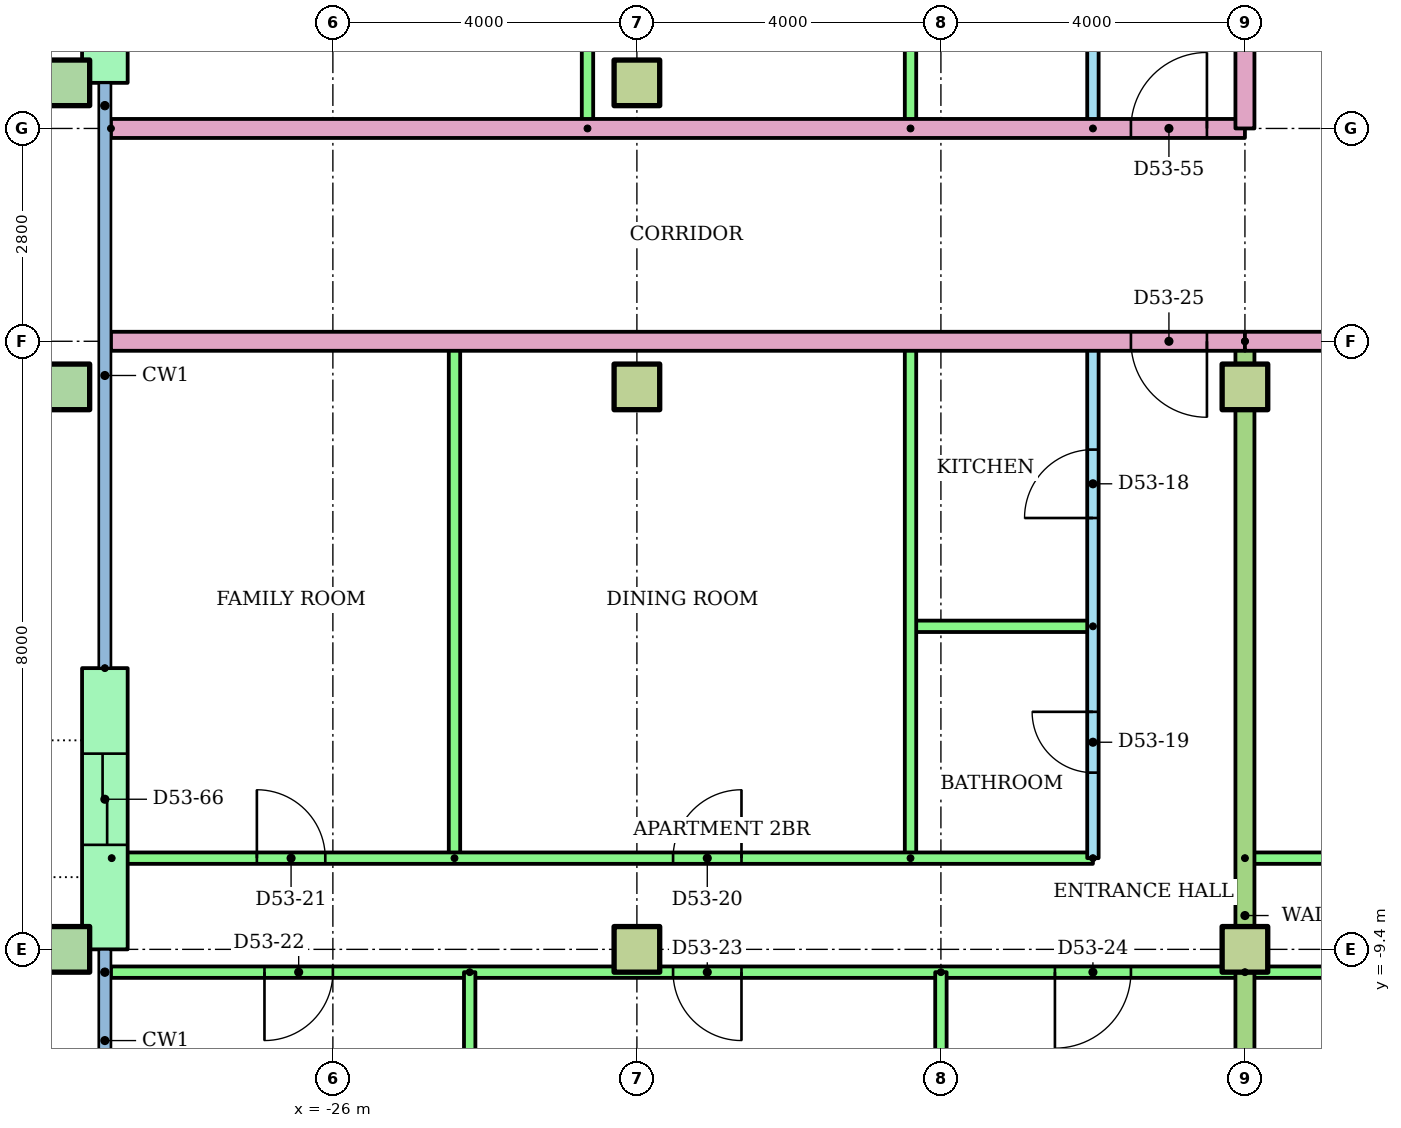
"""IFC4 building model, lengths in metres.
Left out: names, types, materials, properties, quantities, classifications, styles, units other than length and angle.
Written with IfcOpenShell. Run it as: python <this file> out.ifc"""

import sys

from ifc_helpers import new_model, si_unit, direction, frame, frame_2d, origin, origin_2d, place, context, subcontext, project, spatial, rectangle, hollow_rectangle, extrude, element, fill, save


model = new_model("IFC4")
c1 = context("Model", 3, precision=1e-05, world=origin(), true_north=direction((0.0, 1.0)))
c2 = subcontext(c1, "Body", "Model", "MODEL_VIEW")
j1 = project(units=[si_unit("LENGTHUNIT", "METRE"), si_unit("PLANEANGLEUNIT", "RADIAN")], contexts=[c1])
p1 = place(None, origin())
s1 = spatial("IfcSite", under=j1, at=p1, CompositionType="ELEMENT")
p2 = place(p1, origin())
s2 = spatial("IfcBuilding", under=s1, at=p2, CompositionType="ELEMENT")
p3 = place(p2, frame((0.0, 0.0, 207.6)))
s3 = spatial("IfcBuildingStorey", under=s2, at=p3, CompositionType="ELEMENT", Elevation=207.6)
p4 = place(p3, frame((-29.5, -9.4, 0.0)))
e1 = element("IfcColumn", 1, at=p4, inside=s3, PredefinedType="COLUMN", context=c2, shape_type="SweptSolid", body=[
    extrude(hollow_rectangle(XDim=0.6, YDim=0.6, WallThickness=0.03, at=origin_2d()), origin(), (0.0, 0.0, 1.0), 3.2),
])
for number, where in (
    (2, (-22.0, -9.4, 0.0)),
    (3, (-14.0, -9.4, 0.0)),
):
    element("IfcColumn", number, at=place(p3, frame(where)), inside=s3, PredefinedType="COLUMN", context=c2, shape_type="SweptSolid", body=[
        extrude(rectangle(XDim=0.6, YDim=0.6, at=origin_2d()), origin(), (0.0, 0.0, 1.0), 3.2),
    ])
p5 = place(p3, frame((-29.5, -2.0, 0.0)))
e4 = element("IfcColumn", 4, at=p5, inside=s3, PredefinedType="COLUMN", context=c2, shape_type="SweptSolid", body=[
    extrude(hollow_rectangle(XDim=0.6, YDim=0.6, WallThickness=0.03, at=origin_2d()), origin(), (0.0, 0.0, 1.0), 3.2),
])
for number, where in (
    (5, (-22.0, -2.0, 0.0)),
    (6, (-14.0, -2.0, 0.0)),
):
    element("IfcColumn", number, at=place(p3, frame(where)), inside=s3, PredefinedType="COLUMN", context=c2, shape_type="SweptSolid", body=[
        extrude(rectangle(XDim=0.6, YDim=0.6, at=origin_2d()), origin(), (0.0, 0.0, 1.0), 3.2),
    ])
p6 = place(p3, frame((-29.5, 2.0, 0.0)))
e7 = element("IfcColumn", 7, at=p6, inside=s3, PredefinedType="COLUMN", context=c2, shape_type="SweptSolid", body=[
    extrude(hollow_rectangle(XDim=0.6, YDim=0.6, WallThickness=0.03, at=origin_2d()), origin(), (0.0, 0.0, 1.0), 3.2),
])
p7 = place(p3, frame((-22.0, 2.0, 0.0)))
e8 = element("IfcColumn", 8, at=p7, inside=s3, PredefinedType="COLUMN", context=c2, shape_type="SweptSolid", body=[
    extrude(rectangle(XDim=0.6, YDim=0.6, at=origin_2d()), origin(), (0.0, 0.0, 1.0), 3.2),
])
p8 = place(p3, frame((-29.0, 6.5, 0.0), z_axis=(0.0, 0.0, 1.0), x_axis=(0.0, -1.0, 0.0)))
e9 = element("IfcWall", 9, at=p8, inside=s3, PredefinedType="STANDARD", context=c2, shape_type="SweptSolid", body=[
    extrude(rectangle(XDim=4.5, YDim=0.6, at=frame_2d((2.25, 0.0))), origin(), (0.0, 0.0, 1.0), 2.92),
])
p9 = place(p8, frame((1.65, 0.0, 0.0)))
e10 = element("IfcOpeningElement", 10, at=p9, cuts=e9, PredefinedType="OPENING", context=c2, shape_type="SweptSolid", body=[
    extrude(rectangle(XDim=1.2, YDim=2.1, at=frame_2d((0.6, 1.05))), frame((0.0, 0.31, 0.0), z_axis=(0.0, -1.0, 0.0), x_axis=(1.0, 0.0, 0.0)), (0.0, 0.0, 1.0), 0.62),
])
p10 = place(p3, frame((-29.0, -5.7, 0.0), z_axis=(0.0, 0.0, 1.0), x_axis=(0.0, -1.0, 0.0)))
e11 = element("IfcWall", 11, at=p10, inside=s3, PredefinedType="STANDARD", context=c2, shape_type="SweptSolid", body=[
    extrude(rectangle(XDim=3.7, YDim=0.6, at=frame_2d((1.85, 0.0))), origin(), (0.0, 0.0, 1.0), 2.92),
])
p11 = place(p10, frame((1.125, 0.0, 0.0)))
e12 = element("IfcOpeningElement", 12, at=p11, cuts=e11, PredefinedType="OPENING", context=c2, shape_type="SweptSolid", body=[
    extrude(rectangle(XDim=1.2, YDim=2.1, at=frame_2d((0.6, 1.05))), frame((0.0, 0.31, 0.0), z_axis=(0.0, -1.0, 0.0), x_axis=(1.0, 0.0, 0.0)), (0.0, 0.0, 1.0), 0.62),
])
p12 = place(p3, frame((-16.0, -8.2, 0.0), z_axis=(0.0, 0.0, 1.0), x_axis=(0.0, 1.0, 0.0)))
e13 = element("IfcWall", 13, at=p12, inside=s3, PredefinedType="PARTITIONING", context=c2, shape_type="SweptSolid", body=[
    extrude(rectangle(XDim=6.8, YDim=0.15, at=frame_2d((3.4, 0.0))), origin(), (0.0, 0.0, 1.0), 2.4),
])
p13 = place(p12, frame((4.475, 0.0, 0.0)))
e14 = element("IfcOpeningElement", 14, at=p13, cuts=e13, PredefinedType="OPENING", context=c2, shape_type="SweptSolid", body=[
    extrude(rectangle(XDim=0.9, YDim=2.1, at=frame_2d((0.45, 1.05))), frame((0.0, 0.085, 0.0), z_axis=(0.0, -1.0, 0.0), x_axis=(1.0, 0.0, 0.0)), (0.0, 0.0, 1.0), 0.17),
])
p14 = place(p12, frame((1.125, 0.0, 0.0)))
e15 = element("IfcOpeningElement", 15, at=p14, cuts=e13, PredefinedType="OPENING", context=c2, shape_type="SweptSolid", body=[
    extrude(rectangle(XDim=0.8, YDim=2.1, at=frame_2d((0.4, 1.05))), frame((0.0, 0.085, 0.0), z_axis=(0.0, -1.0, 0.0), x_axis=(1.0, 0.0, 0.0)), (0.0, 0.0, 1.0), 0.17),
])
p15 = place(p3, frame((-16.0, -5.15, 0.0), z_axis=(0.0, 0.0, 1.0), x_axis=(-1.0, 0.0, 0.0)))
e16 = element("IfcWall", 16, at=p15, inside=s3, PredefinedType="PARTITIONING", context=c2, shape_type="SweptSolid", body=[
    extrude(rectangle(XDim=2.4, YDim=0.15, at=frame_2d((1.2, 0.0))), origin(), (0.0, 0.0, 1.0), 2.4),
])
for number, where, z_axis, x_axis in (
    (17, (-18.4, -8.2, 0.0), (0.0, 0.0, 1.0), (0.0, 1.0, 0.0)),
    (18, (-24.4, -8.2, 0.0), (0.0, 0.0, 1.0), (0.0, 1.0, 0.0)),
):
    element("IfcWall", number, at=place(p3, frame(where, z_axis=z_axis, x_axis=x_axis)), inside=s3, PredefinedType="PARTITIONING", context=c2, shape_type="SweptSolid", body=[
        extrude(rectangle(XDim=6.8, YDim=0.15, at=frame_2d((3.4, 0.0))), origin(), (0.0, 0.0, 1.0), 2.4),
    ])
p16 = place(p3, frame((-28.91, -8.2, 0.0)))
e19 = element("IfcWall", 19, at=p16, inside=s3, PredefinedType="PARTITIONING", context=c2, shape_type="SweptSolid", body=[
    extrude(rectangle(XDim=12.91, YDim=0.15, at=frame_2d((6.455, 0.0))), origin(), (0.0, 0.0, 1.0), 2.4),
])
p17 = place(p16, frame((7.386, 0.0, 0.0)))
e20 = element("IfcOpeningElement", 20, at=p17, cuts=e19, PredefinedType="OPENING", context=c2, shape_type="SweptSolid", body=[
    extrude(rectangle(XDim=0.9, YDim=2.1, at=frame_2d((0.45, 1.05))), frame((0.0, 0.085, 0.0), z_axis=(0.0, -1.0, 0.0), x_axis=(1.0, 0.0, 0.0)), (0.0, 0.0, 1.0), 0.17),
])
p18 = place(p16, frame((1.91, 0.0, 0.0)))
e21 = element("IfcOpeningElement", 21, at=p18, cuts=e19, PredefinedType="OPENING", context=c2, shape_type="SweptSolid", body=[
    extrude(rectangle(XDim=0.9, YDim=2.1, at=frame_2d((0.45, 1.05))), frame((0.0, 0.085, 0.0), z_axis=(0.0, -1.0, 0.0), x_axis=(1.0, 0.0, 0.0)), (0.0, 0.0, 1.0), 0.17),
])
p19 = place(p3, frame((-14.0, -9.7, 0.0), z_axis=(0.0, 0.0, 1.0), x_axis=(-1.0, 0.0, 0.0)))
e22 = element("IfcWall", 22, at=p19, inside=s3, PredefinedType="PARTITIONING", context=c2, shape_type="SweptSolid", body=[
    extrude(rectangle(XDim=14.92, YDim=0.15, at=frame_2d((7.46, 0.0))), origin(), (0.0, 0.0, 1.0), 2.4),
])
p20 = place(p19, frame((12.0, 0.0, 0.0)))
e23 = element("IfcOpeningElement", 23, at=p20, cuts=e22, PredefinedType="OPENING", context=c2, shape_type="SweptSolid", body=[
    extrude(rectangle(XDim=0.9, YDim=2.1, at=frame_2d((0.45, 1.05))), frame((0.0, 0.085, 0.0), z_axis=(0.0, -1.0, 0.0), x_axis=(1.0, 0.0, 0.0)), (0.0, 0.0, 1.0), 0.17),
])
p21 = place(p19, frame((6.624, 0.0, 0.0)))
e24 = element("IfcOpeningElement", 24, at=p21, cuts=e22, PredefinedType="OPENING", context=c2, shape_type="SweptSolid", body=[
    extrude(rectangle(XDim=0.9, YDim=2.1, at=frame_2d((0.45, 1.05))), frame((0.0, 0.085, 0.0), z_axis=(0.0, -1.0, 0.0), x_axis=(1.0, 0.0, 0.0)), (0.0, 0.0, 1.0), 0.17),
])
p22 = place(p19, frame((1.5, 0.0, 0.0)))
e25 = element("IfcOpeningElement", 25, at=p22, cuts=e22, PredefinedType="OPENING", context=c2, shape_type="SweptSolid", body=[
    extrude(rectangle(XDim=1.0, YDim=2.1, at=frame_2d((0.5, 1.05))), frame((0.0, 0.085, 0.0), z_axis=(0.0, -1.0, 0.0), x_axis=(1.0, 0.0, 0.0)), (0.0, 0.0, 1.0), 0.17),
])
p23 = place(p3, frame((-24.2, -9.7, 0.0), z_axis=(0.0, 0.0, 1.0), x_axis=(0.0, -1.0, 0.0)))
e26 = element("IfcWall", 26, at=p23, inside=s3, PredefinedType="PARTITIONING", context=c2, shape_type="SweptSolid", body=[
    extrude(rectangle(XDim=5.02, YDim=0.15, at=frame_2d((2.51, 0.0))), origin(), (0.0, 0.0, 1.0), 2.4),
])
p24 = place(p3, frame((-18.0, -9.7, 0.0), z_axis=(0.0, 0.0, 1.0), x_axis=(0.0, -1.0, 0.0)))
e27 = element("IfcWall", 27, at=p24, inside=s3, PredefinedType="PARTITIONING", context=c2, shape_type="SweptSolid", body=[
    extrude(rectangle(XDim=6.821, YDim=0.15, at=frame_2d((3.411, 0.0))), origin(), (0.0, 0.0, 1.0), 2.4),
])
p25 = place(p3, frame((-14.0, -8.2, 0.0)))
e28 = element("IfcWall", 28, at=p25, inside=s3, PredefinedType="PARTITIONING", context=c2, shape_type="SweptSolid", body=[
    extrude(rectangle(XDim=22.0, YDim=0.15, at=frame_2d((11.0, 0.0))), origin(), (0.0, 0.0, 1.0), 2.4),
])
p26 = place(p25, frame((14.624, 0.0, 0.0)))
e29 = element("IfcOpeningElement", 29, at=p26, cuts=e28, PredefinedType="OPENING", context=c2, shape_type="SweptSolid", body=[
    extrude(rectangle(XDim=0.9, YDim=2.1, at=frame_2d((0.45, 1.05))), frame((0.0, 0.085, 0.0), z_axis=(0.0, -1.0, 0.0), x_axis=(1.0, 0.0, 0.0)), (0.0, 0.0, 1.0), 0.17),
])
p27 = place(p25, frame((8.476, 0.0, 0.0)))
e30 = element("IfcOpeningElement", 30, at=p27, cuts=e28, PredefinedType="OPENING", context=c2, shape_type="SweptSolid", body=[
    extrude(rectangle(XDim=0.9, YDim=2.1, at=frame_2d((0.45, 1.05))), frame((0.0, 0.085, 0.0), z_axis=(0.0, -1.0, 0.0), x_axis=(1.0, 0.0, 0.0)), (0.0, 0.0, 1.0), 0.17),
])
p28 = place(p25, frame((1.975, 0.0, 0.0)))
e31 = element("IfcOpeningElement", 31, at=p28, cuts=e28, PredefinedType="OPENING", context=c2, shape_type="SweptSolid", body=[
    extrude(rectangle(XDim=0.9, YDim=2.1, at=frame_2d((0.45, 1.05))), frame((0.0, 0.085, 0.0), z_axis=(0.0, -1.0, 0.0), x_axis=(1.0, 0.0, 0.0)), (0.0, 0.0, 1.0), 0.17),
])
p29 = place(p3, frame((10.0, -9.7, 0.0), z_axis=(0.0, 0.0, 1.0), x_axis=(-1.0, 0.0, 0.0)))
e32 = element("IfcWall", 32, at=p29, inside=s3, PredefinedType="PARTITIONING", context=c2, shape_type="SweptSolid", body=[
    extrude(rectangle(XDim=24.0, YDim=0.15, at=frame_2d((12.0, 0.0))), origin(), (0.0, 0.0, 1.0), 2.4),
])
p30 = place(p29, frame((21.55, 0.0, 0.0)))
e33 = element("IfcOpeningElement", 33, at=p30, cuts=e32, PredefinedType="OPENING", context=c2, shape_type="SweptSolid", body=[
    extrude(rectangle(XDim=0.9, YDim=2.1, at=frame_2d((0.45, 1.05))), frame((0.0, 0.085, 0.0), z_axis=(0.0, -1.0, 0.0), x_axis=(1.0, 0.0, 0.0)), (0.0, 0.0, 1.0), 0.17),
])
p31 = place(p29, frame((17.55, 0.0, 0.0)))
e34 = element("IfcOpeningElement", 34, at=p31, cuts=e32, PredefinedType="OPENING", context=c2, shape_type="SweptSolid", body=[
    extrude(rectangle(XDim=0.9, YDim=2.1, at=frame_2d((0.45, 1.05))), frame((0.0, 0.085, 0.0), z_axis=(0.0, -1.0, 0.0), x_axis=(1.0, 0.0, 0.0)), (0.0, 0.0, 1.0), 0.17),
])
p32 = place(p29, frame((11.5, 0.0, 0.0)))
e35 = element("IfcOpeningElement", 35, at=p32, cuts=e32, PredefinedType="OPENING", context=c2, shape_type="SweptSolid", body=[
    extrude(rectangle(XDim=1.0, YDim=2.1, at=frame_2d((0.5, 1.05))), frame((0.0, 0.085, 0.0), z_axis=(0.0, -1.0, 0.0), x_axis=(1.0, 0.0, 0.0)), (0.0, 0.0, 1.0), 0.17),
])
p33 = place(p29, frame((5.55, 0.0, 0.0)))
e36 = element("IfcOpeningElement", 36, at=p33, cuts=e32, PredefinedType="OPENING", context=c2, shape_type="SweptSolid", body=[
    extrude(rectangle(XDim=0.9, YDim=2.1, at=frame_2d((0.45, 1.05))), frame((0.0, 0.085, 0.0), z_axis=(0.0, -1.0, 0.0), x_axis=(1.0, 0.0, 0.0)), (0.0, 0.0, 1.0), 0.17),
])
p34 = place(p29, frame((1.55, 0.0, 0.0)))
e37 = element("IfcOpeningElement", 37, at=p34, cuts=e32, PredefinedType="OPENING", context=c2, shape_type="SweptSolid", body=[
    extrude(rectangle(XDim=0.9, YDim=2.1, at=frame_2d((0.45, 1.05))), frame((0.0, 0.085, 0.0), z_axis=(0.0, -1.0, 0.0), x_axis=(1.0, 0.0, 0.0)), (0.0, 0.0, 1.0), 0.17),
])
p35 = place(p3, frame((-14.0, -1.4, 0.0), z_axis=(0.0, 0.0, 1.0), x_axis=(0.0, -1.0, 0.0)))
e38 = element("IfcWall", 38, at=p35, inside=s3, PredefinedType="PARTITIONING", context=c2, shape_type="SweptSolid", body=[
    extrude(rectangle(XDim=15.11, YDim=0.25, at=frame_2d((7.555, 0.0))), origin(), (0.0, 0.0, 1.0), 2.4),
])
p36 = place(p3, frame((-14.0, -1.4, 0.0), z_axis=(0.0, 0.0, 1.0), x_axis=(-1.0, 0.0, 0.0)))
e39 = element("IfcWall", 39, at=p36, inside=s3, PredefinedType="PARTITIONING", context=c2, shape_type="SweptSolid", body=[
    extrude(rectangle(XDim=14.92, YDim=0.25, at=frame_2d((7.46, 0.0))), origin(), (0.0, 0.0, 1.0), 2.4),
])
p37 = place(p36, frame((0.5, 0.0, 0.0)))
e40 = element("IfcOpeningElement", 40, at=p37, cuts=e39, PredefinedType="OPENING", context=c2, shape_type="SweptSolid", body=[
    extrude(rectangle(XDim=1.0, YDim=2.1, at=frame_2d((0.5, 1.05))), frame((0.0, 0.135, 0.0), z_axis=(0.0, -1.0, 0.0), x_axis=(1.0, 0.0, 0.0)), (0.0, 0.0, 1.0), 0.27),
])
p38 = place(p3, frame((-16.0, 1.4, 0.0), z_axis=(0.0, 0.0, 1.0), x_axis=(0.0, 1.0, 0.0)))
e41 = element("IfcWall", 41, at=p38, inside=s3, PredefinedType="PARTITIONING", context=c2, shape_type="SweptSolid", body=[
    extrude(rectangle(XDim=9.2, YDim=0.15, at=frame_2d((4.6, 0.0))), origin(), (0.0, 0.0, 1.0), 2.4),
])
p39 = place(p38, frame((2.05, 0.0, 0.0)))
e42 = element("IfcOpeningElement", 42, at=p39, cuts=e41, PredefinedType="OPENING", context=c2, shape_type="SweptSolid", body=[
    extrude(rectangle(XDim=0.9, YDim=2.1, at=frame_2d((0.45, 1.05))), frame((0.0, 0.085, 0.0), z_axis=(0.0, -1.0, 0.0), x_axis=(1.0, 0.0, 0.0)), (0.0, 0.0, 1.0), 0.17),
])
p40 = place(p38, frame((6.7, 0.0, 0.0)))
e43 = element("IfcOpeningElement", 43, at=p40, cuts=e41, PredefinedType="OPENING", context=c2, shape_type="SweptSolid", body=[
    extrude(rectangle(XDim=0.8, YDim=2.1, at=frame_2d((0.4, 1.05))), frame((0.0, 0.085, 0.0), z_axis=(0.0, -1.0, 0.0), x_axis=(1.0, 0.0, 0.0)), (0.0, 0.0, 1.0), 0.17),
])
for number, where, z_axis, x_axis in (
    (44, (-18.4, 1.4, 0.0), (0.0, 0.0, 1.0), (0.0, 1.0, 0.0)),
    (45, (-22.65, 1.4, 0.0), (0.0, 0.0, 1.0), (0.0, 1.0, 0.0)),
):
    element("IfcWall", number, at=place(p3, frame(where, z_axis=z_axis, x_axis=x_axis)), inside=s3, PredefinedType="PARTITIONING", context=c2, shape_type="SweptSolid", body=[
        extrude(rectangle(XDim=9.2, YDim=0.15, at=frame_2d((4.6, 0.0))), origin(), (0.0, 0.0, 1.0), 2.4),
    ])
p41 = place(p3, frame((-28.92, 1.4, 0.0)))
e46 = element("IfcWall", 46, at=p41, inside=s3, PredefinedType="PARTITIONING", context=c2, shape_type="SweptSolid", body=[
    extrude(rectangle(XDim=14.92, YDim=0.25, at=frame_2d((7.46, 0.0))), origin(), (0.0, 0.0, 1.0), 2.4),
])
p42 = place(p41, frame((13.42, 0.0, 0.0)))
e47 = element("IfcOpeningElement", 47, at=p42, cuts=e46, PredefinedType="OPENING", context=c2, shape_type="SweptSolid", body=[
    extrude(rectangle(XDim=1.0, YDim=2.1, at=frame_2d((0.5, 1.05))), frame((0.0, 0.135, 0.0), z_axis=(0.0, -1.0, 0.0), x_axis=(1.0, 0.0, 0.0)), (0.0, 0.0, 1.0), 0.27),
])
p43 = place(p3, frame((14.0, -1.4, 0.0), z_axis=(0.0, 0.0, 1.0), x_axis=(-1.0, 0.0, 0.0)))
e48 = element("IfcWall", 48, at=p43, inside=s3, PredefinedType="PARTITIONING", context=c2, shape_type="SweptSolid", body=[
    extrude(rectangle(XDim=28.0, YDim=0.25, at=frame_2d((14.0, 0.0))), origin(), (0.0, 0.0, 1.0), 2.4),
])
p44 = place(p43, frame((4.5, 0.0, 0.0)))
e49 = element("IfcOpeningElement", 49, at=p44, cuts=e48, PredefinedType="OPENING", context=c2, shape_type="SweptSolid", body=[
    extrude(rectangle(XDim=1.0, YDim=2.1, at=frame_2d((0.5, 1.05))), frame((0.0, 0.135, 0.0), z_axis=(0.0, -1.0, 0.0), x_axis=(1.0, 0.0, 0.0)), (0.0, 0.0, 1.0), 0.27),
])
p45 = place(p43, frame((2.5, 0.0, 0.0)))
e50 = element("IfcOpeningElement", 50, at=p45, cuts=e48, PredefinedType="OPENING", context=c2, shape_type="SweptSolid", body=[
    extrude(rectangle(XDim=1.0, YDim=2.1, at=frame_2d((0.5, 1.05))), frame((0.0, 0.135, 0.0), z_axis=(0.0, -1.0, 0.0), x_axis=(1.0, 0.0, 0.0)), (0.0, 0.0, 1.0), 0.27),
])
p46 = place(p3, frame((-14.0, 3.0, 0.0), z_axis=(0.0, 0.0, 1.0), x_axis=(0.0, -1.0, 0.0)))
e51 = element("IfcWall", 51, at=p46, inside=s3, PredefinedType="PARTITIONING", context=c2, shape_type="SweptSolid", body=[
    extrude(rectangle(XDim=1.6, YDim=0.25, at=frame_2d((0.8, 0.0))), origin(), (0.0, 0.0, 1.0), 2.4),
])
p47 = place(p13, origin())
e52 = element("IfcDoor", 52, at=p47, inside=s3, OperationType="SINGLE_SWING_LEFT", PredefinedType="DOOR", context=c2, shape_type="SweptSolid", body=[
    extrude(rectangle(XDim=0.9, YDim=2.1, at=frame_2d((0.45, 1.05))), frame((0.0, 0.025, 0.0), z_axis=(0.0, -1.0, 0.0), x_axis=(1.0, 0.0, 0.0)), (0.0, 0.0, 1.0), 0.05),
])
fill(e14, e52)
p48 = place(p14, origin())
e53 = element("IfcDoor", 53, at=p48, inside=s3, OperationType="SINGLE_SWING_RIGHT", PredefinedType="DOOR", context=c2, shape_type="SweptSolid", body=[
    extrude(rectangle(XDim=0.8, YDim=2.1, at=frame_2d((0.4, 1.05))), frame((0.0, 0.025, 0.0), z_axis=(0.0, -1.0, 0.0), x_axis=(1.0, 0.0, 0.0)), (0.0, 0.0, 1.0), 0.05),
])
fill(e15, e53)
p49 = place(p17, origin())
e54 = element("IfcDoor", 54, at=p49, inside=s3, OperationType="SINGLE_SWING_RIGHT", PredefinedType="DOOR", context=c2, shape_type="SweptSolid", body=[
    extrude(rectangle(XDim=0.9, YDim=2.1, at=frame_2d((0.45, 1.05))), frame((0.0, 0.025, 0.0), z_axis=(0.0, -1.0, 0.0), x_axis=(1.0, 0.0, 0.0)), (0.0, 0.0, 1.0), 0.05),
])
fill(e20, e54)
p50 = place(p18, origin())
e55 = element("IfcDoor", 55, at=p50, inside=s3, OperationType="SINGLE_SWING_LEFT", PredefinedType="DOOR", context=c2, shape_type="SweptSolid", body=[
    extrude(rectangle(XDim=0.9, YDim=2.1, at=frame_2d((0.45, 1.05))), frame((0.0, 0.025, 0.0), z_axis=(0.0, -1.0, 0.0), x_axis=(1.0, 0.0, 0.0)), (0.0, 0.0, 1.0), 0.05),
])
fill(e21, e55)
p51 = place(p20, origin())
e56 = element("IfcDoor", 56, at=p51, inside=s3, OperationType="SINGLE_SWING_RIGHT", PredefinedType="DOOR", context=c2, shape_type="SweptSolid", body=[
    extrude(rectangle(XDim=0.9, YDim=2.1, at=frame_2d((0.45, 1.05))), frame((0.0, 0.025, 0.0), z_axis=(0.0, -1.0, 0.0), x_axis=(1.0, 0.0, 0.0)), (0.0, 0.0, 1.0), 0.05),
])
fill(e23, e56)
p52 = place(p21, origin())
e57 = element("IfcDoor", 57, at=p52, inside=s3, OperationType="SINGLE_SWING_LEFT", PredefinedType="DOOR", context=c2, shape_type="SweptSolid", body=[
    extrude(rectangle(XDim=0.9, YDim=2.1, at=frame_2d((0.45, 1.05))), frame((0.0, 0.025, 0.0), z_axis=(0.0, -1.0, 0.0), x_axis=(1.0, 0.0, 0.0)), (0.0, 0.0, 1.0), 0.05),
])
fill(e24, e57)
p53 = place(p22, origin())
e58 = element("IfcDoor", 58, at=p53, inside=s3, OperationType="SINGLE_SWING_RIGHT", PredefinedType="DOOR", context=c2, shape_type="SweptSolid", body=[
    extrude(rectangle(XDim=1.0, YDim=2.1, at=frame_2d((0.5, 1.05))), frame((0.0, 0.025, 0.0), z_axis=(0.0, -1.0, 0.0), x_axis=(1.0, 0.0, 0.0)), (0.0, 0.0, 1.0), 0.05),
])
fill(e25, e58)
p54 = place(p37, origin())
e59 = element("IfcDoor", 59, at=p54, inside=s3, OperationType="SINGLE_SWING_LEFT", PredefinedType="DOOR", context=c2, shape_type="SweptSolid", body=[
    extrude(rectangle(XDim=1.0, YDim=2.1, at=frame_2d((0.5, 1.05))), frame((0.0, 0.025, 0.0), z_axis=(0.0, -1.0, 0.0), x_axis=(1.0, 0.0, 0.0)), (0.0, 0.0, 1.0), 0.05),
])
fill(e40, e59)
p55 = place(p42, origin())
e60 = element("IfcDoor", 60, at=p55, inside=s3, OperationType="SINGLE_SWING_RIGHT", PredefinedType="DOOR", context=c2, shape_type="SweptSolid", body=[
    extrude(rectangle(XDim=1.0, YDim=2.1, at=frame_2d((0.5, 1.05))), frame((0.0, 0.025, 0.0), z_axis=(0.0, -1.0, 0.0), x_axis=(1.0, 0.0, 0.0)), (0.0, 0.0, 1.0), 0.05),
])
fill(e47, e60)
p56 = place(p11, origin())
e61 = element("IfcDoor", 61, at=p56, inside=s3, OperationType="SLIDING_TO_LEFT", PredefinedType="DOOR", context=c2, shape_type="SweptSolid", body=[
    extrude(rectangle(XDim=1.2, YDim=2.1, at=frame_2d((0.6, 1.05))), frame((0.0, 0.025, 0.0), z_axis=(0.0, -1.0, 0.0), x_axis=(1.0, 0.0, 0.0)), (0.0, 0.0, 1.0), 0.05),
])
fill(e12, e61)
save(model, sys.argv[1])
